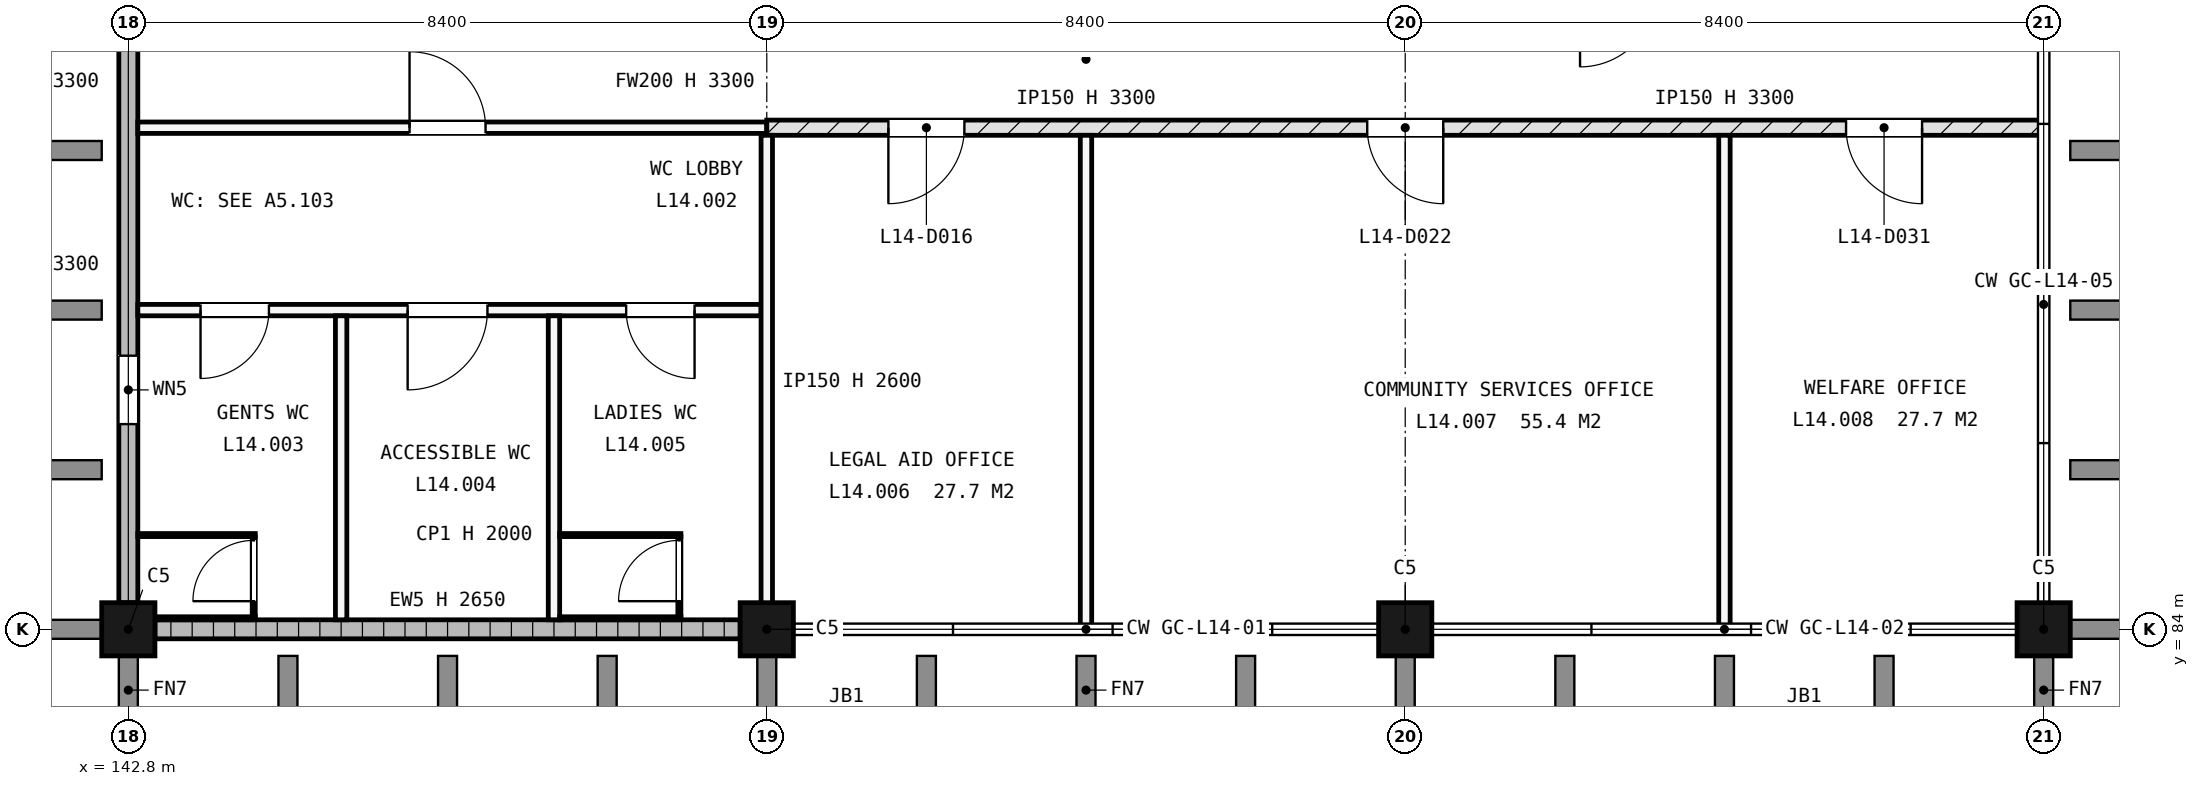
"""IFC4 building model, lengths in metres.
Left out: names, types, materials, properties, quantities, classifications, styles, units other than length and angle.
Written with IfcOpenShell. Run it as: python <this file> out.ifc"""

import sys

from ifc_helpers import new_model, si_unit, direction, frame, frame_2d, origin, origin_2d, place, context, subcontext, project, spatial, rectangle, extrude, element, fill, save


model = new_model("IFC4")
c1 = context("Model", 3, precision=1e-05, world=origin(), true_north=direction((0.0, 1.0)))
c2 = subcontext(c1, "Body", "Model", "MODEL_VIEW")
j1 = project(units=[si_unit("LENGTHUNIT", "METRE"), si_unit("PLANEANGLEUNIT", "RADIAN")], contexts=[c1])
p1 = place(None, origin())
s1 = spatial("IfcSite", under=j1, at=p1, CompositionType="ELEMENT")
p2 = place(p1, origin())
s2 = spatial("IfcBuilding", under=s1, at=p2, CompositionType="ELEMENT")
p3 = place(p2, frame((0.0, 0.0, 54.0)))
s3 = spatial("IfcBuildingStorey", under=s2, at=p3, CompositionType="ELEMENT", Elevation=54.0)
for number, where, z_axis, x_axis in (
    (1, (142.8, 84.0, -0.3), (0.0, 0.0, 1.0), (1.0, 0.0, 0.0)),
    (2, (151.2, 84.0, -0.3), (0.0, 0.0, 1.0), (1.0, 0.0, 0.0)),
    (3, (159.6, 84.0, -0.3), (0.0, 0.0, 1.0), (1.0, 0.0, 0.0)),
    (4, (168.0, 84.0, -0.3), (0.0, 0.0, 1.0), (1.0, 0.0, 0.0)),
):
    element("IfcColumn", number, at=place(p3, frame(where, z_axis=z_axis, x_axis=x_axis)), inside=s3, PredefinedType="COLUMN", context=c2, shape_type="SweptSolid", body=[
        extrude(rectangle(XDim=0.7, YDim=0.7, at=origin_2d()), origin(), (0.0, 0.0, 1.0), 3.6),
    ])
p4 = place(p3, frame((143.15, 84.0, 0.0), z_axis=(0.0, 0.0, 1.0), x_axis=(1.0, 0.0, 0.0)))
e5 = element("IfcWall", 5, at=p4, inside=s3, PredefinedType="STANDARD", context=c2, shape_type="SweptSolid", body=[
    extrude(rectangle(XDim=7.7, YDim=0.25, at=frame_2d((3.85, 0.0))), origin(), (0.0, 0.0, 1.0), 2.65),
])
p5 = place(p3, frame((142.8, 84.35, 0.0), z_axis=(0.0, 0.0, 1.0), x_axis=(0.0, 1.0, 0.0)))
e6 = element("IfcWall", 6, at=p5, inside=s3, PredefinedType="STANDARD", context=c2, shape_type="SweptSolid", body=[
    extrude(rectangle(XDim=7.85, YDim=0.25, at=frame_2d((3.925, 0.0))), origin(), (0.0, 0.0, 1.0), 3.3),
])
p6 = place(p5, frame((2.35, 0.0, 2.1)))
e7 = element("IfcOpeningElement", 7, at=p6, cuts=e6, PredefinedType="OPENING", context=c2, shape_type="SweptSolid", body=[
    extrude(rectangle(XDim=0.9, YDim=0.6, at=frame_2d((0.45, 0.3))), frame((0.0, 0.135, 0.0), z_axis=(0.0, -1.0, 0.0), x_axis=(1.0, 0.0, 0.0)), (0.0, 0.0, 1.0), 0.27),
])
p7 = place(p3, frame((142.925, 88.2, 0.0), z_axis=(0.0, 0.0, 1.0), x_axis=(1.0, 0.0, 0.0)))
e8 = element("IfcWall", 8, at=p7, inside=s3, PredefinedType="PARTITIONING", context=c2, shape_type="SweptSolid", body=[
    extrude(rectangle(XDim=8.2, YDim=0.15, at=frame_2d((4.1, 0.0))), origin(), (0.0, 0.0, 1.0), 3.3),
])
p8 = place(p7, frame((0.825, 0.0, 0.0)))
e9 = element("IfcOpeningElement", 9, at=p8, cuts=e8, PredefinedType="OPENING", context=c2, shape_type="SweptSolid", body=[
    extrude(rectangle(XDim=0.9, YDim=2.1, at=frame_2d((0.45, 1.05))), frame((0.0, 0.085, 0.0), z_axis=(0.0, -1.0, 0.0), x_axis=(1.0, 0.0, 0.0)), (0.0, 0.0, 1.0), 0.17),
])
p9 = place(p7, frame((3.55, 0.0, 0.0)))
e10 = element("IfcOpeningElement", 10, at=p9, cuts=e8, PredefinedType="OPENING", context=c2, shape_type="SweptSolid", body=[
    extrude(rectangle(XDim=1.05, YDim=2.25, at=frame_2d((0.525, 1.125))), frame((0.0, 0.085, 0.0), z_axis=(0.0, -1.0, 0.0), x_axis=(1.0, 0.0, 0.0)), (0.0, 0.0, 1.0), 0.17),
])
p10 = place(p7, frame((6.425, 0.0, 0.0)))
e11 = element("IfcOpeningElement", 11, at=p10, cuts=e8, PredefinedType="OPENING", context=c2, shape_type="SweptSolid", body=[
    extrude(rectangle(XDim=0.9, YDim=2.1, at=frame_2d((0.45, 1.05))), frame((0.0, 0.085, 0.0), z_axis=(0.0, -1.0, 0.0), x_axis=(1.0, 0.0, 0.0)), (0.0, 0.0, 1.0), 0.17),
])
p11 = place(p3, frame((142.925, 90.6, 0.0), z_axis=(0.0, 0.0, 1.0), x_axis=(1.0, 0.0, 0.0)))
e12 = element("IfcWall", 12, at=p11, inside=s3, PredefinedType="PARTITIONING", context=c2, shape_type="SweptSolid", body=[
    extrude(rectangle(XDim=8.275, YDim=0.15, at=frame_2d((4.137, 0.0))), origin(), (0.0, 0.0, 1.0), 3.3),
])
p12 = place(p11, frame((3.575, 0.0, 0.0)))
e13 = element("IfcOpeningElement", 13, at=p12, cuts=e12, PredefinedType="OPENING", context=c2, shape_type="SweptSolid", body=[
    extrude(rectangle(XDim=1.0, YDim=2.1, at=frame_2d((0.5, 1.05))), frame((0.0, 0.085, 0.0), z_axis=(0.0, -1.0, 0.0), x_axis=(1.0, 0.0, 0.0)), (0.0, 0.0, 1.0), 0.17),
])
p13 = place(p3, frame((151.2, 90.6, 0.0), z_axis=(0.0, 0.0, 1.0), x_axis=(1.0, 0.0, 0.0)))
e14 = element("IfcWall", 14, at=p13, inside=s3, PredefinedType="SOLIDWALL", context=c2, shape_type="SweptSolid", body=[
    extrude(rectangle(XDim=16.8, YDim=0.2, at=frame_2d((8.4, 0.0))), origin(), (0.0, 0.0, 1.0), 3.3),
])
p14 = place(p13, frame((1.6, 0.0, 0.0)))
e15 = element("IfcOpeningElement", 15, at=p14, cuts=e14, PredefinedType="OPENING", context=c2, shape_type="SweptSolid", body=[
    extrude(rectangle(XDim=1.0, YDim=2.1, at=frame_2d((0.5, 1.05))), frame((0.0, 0.11, 0.0), z_axis=(0.0, -1.0, 0.0), x_axis=(1.0, 0.0, 0.0)), (0.0, 0.0, 1.0), 0.22),
])
p15 = place(p13, frame((7.9, 0.0, 0.0)))
e16 = element("IfcOpeningElement", 16, at=p15, cuts=e14, PredefinedType="OPENING", context=c2, shape_type="SweptSolid", body=[
    extrude(rectangle(XDim=1.0, YDim=2.1, at=frame_2d((0.5, 1.05))), frame((0.0, 0.11, 0.0), z_axis=(0.0, -1.0, 0.0), x_axis=(1.0, 0.0, 0.0)), (0.0, 0.0, 1.0), 0.22),
])
p16 = place(p13, frame((14.2, 0.0, 0.0)))
e17 = element("IfcOpeningElement", 17, at=p16, cuts=e14, PredefinedType="OPENING", context=c2, shape_type="SweptSolid", body=[
    extrude(rectangle(XDim=1.0, YDim=2.1, at=frame_2d((0.5, 1.05))), frame((0.0, 0.11, 0.0), z_axis=(0.0, -1.0, 0.0), x_axis=(1.0, 0.0, 0.0)), (0.0, 0.0, 1.0), 0.22),
])
for number, where, z_axis, x_axis in (
    (18, (145.6, 84.125, 0.0), (0.0, 0.0, 1.0), (0.0, 1.0, 0.0)),
    (19, (148.4, 84.125, 0.0), (0.0, 0.0, 1.0), (0.0, 1.0, 0.0)),
):
    element("IfcWall", number, at=place(p3, frame(where, z_axis=z_axis, x_axis=x_axis)), inside=s3, PredefinedType="PARTITIONING", context=c2, shape_type="SweptSolid", body=[
        extrude(rectangle(XDim=4.0, YDim=0.15, at=frame_2d((2.0, 0.0))), origin(), (0.0, 0.0, 1.0), 3.3),
    ])
p17 = place(p3, frame((151.2, 84.0, 0.0), z_axis=(0.0, 0.0, 1.0), x_axis=(0.0, 1.0, 0.0)))
e20 = element("IfcWall", 20, at=p17, inside=s3, PredefinedType="PARTITIONING", context=c2, shape_type="SweptSolid", body=[
    extrude(rectangle(XDim=6.5, YDim=0.15, at=frame_2d((3.25, 0.0))), origin(), (0.0, 0.0, 1.0), 2.6),
])
for number, where, z_axis, x_axis in (
    (21, (155.4, 84.0, 0.0), (0.0, 0.0, 1.0), (0.0, 1.0, 0.0)),
    (22, (163.8, 84.0, 0.0), (0.0, 0.0, 1.0), (0.0, 1.0, 0.0)),
):
    element("IfcWall", number, at=place(p3, frame(where, z_axis=z_axis, x_axis=x_axis)), inside=s3, PredefinedType="PARTITIONING", context=c2, shape_type="SweptSolid", body=[
        extrude(rectangle(XDim=6.5, YDim=0.15, at=frame_2d((3.25, 0.0))), origin(), (0.0, 0.0, 1.0), 3.3),
    ])
p18 = place(p3, frame((142.93, 84.145, 0.0), z_axis=(0.0, 0.0, 1.0), x_axis=(1.0, 0.0, 0.0)))
e23 = element("IfcWall", 23, at=p18, inside=s3, PredefinedType="PARTITIONING", context=c2, shape_type="SweptSolid", body=[
    extrude(rectangle(XDim=1.54, YDim=0.04, at=frame_2d((0.77, 0.0))), origin(), (0.0, 0.0, 1.0), 2.0),
])
p19 = place(p3, frame((142.925, 85.24, 0.0), z_axis=(0.0, 0.0, 1.0), x_axis=(1.0, 0.0, 0.0)))
e24 = element("IfcWall", 24, at=p19, inside=s3, PredefinedType="PARTITIONING", context=c2, shape_type="SweptSolid", body=[
    extrude(rectangle(XDim=1.545, YDim=0.04, at=frame_2d((0.772, 0.0))), origin(), (0.0, 0.0, 1.0), 2.0),
])
p20 = place(p3, frame((144.45, 84.165, 0.0), z_axis=(0.0, 0.0, 1.0), x_axis=(0.0, 1.0, 0.0)))
e25 = element("IfcWall", 25, at=p20, inside=s3, PredefinedType="PARTITIONING", context=c2, shape_type="SweptSolid", body=[
    extrude(rectangle(XDim=1.055, YDim=0.04, at=frame_2d((0.527, 0.0))), origin(), (0.0, 0.0, 1.0), 2.0),
])
p21 = place(p20, frame((0.205, 0.0, 0.0)))
e26 = element("IfcOpeningElement", 26, at=p21, cuts=e25, PredefinedType="OPENING", context=c2, shape_type="SweptSolid", body=[
    extrude(rectangle(XDim=0.8, YDim=2.0, at=frame_2d((0.4, 1.0))), frame((0.0, 0.03, 0.0), z_axis=(0.0, -1.0, 0.0), x_axis=(1.0, 0.0, 0.0)), (0.0, 0.0, 1.0), 0.06),
])
for number, where, z_axis, x_axis in (
    (27, (148.475, 84.145, 0.0), (0.0, 0.0, 1.0), (1.0, 0.0, 0.0)),
    (28, (148.475, 85.24, 0.0), (0.0, 0.0, 1.0), (1.0, 0.0, 0.0)),
):
    element("IfcWall", number, at=place(p3, frame(where, z_axis=z_axis, x_axis=x_axis)), inside=s3, PredefinedType="PARTITIONING", context=c2, shape_type="SweptSolid", body=[
        extrude(rectangle(XDim=1.595, YDim=0.04, at=frame_2d((0.797, 0.0))), origin(), (0.0, 0.0, 1.0), 2.0),
    ])
p22 = place(p3, frame((150.05, 84.165, 0.0), z_axis=(0.0, 0.0, 1.0), x_axis=(0.0, 1.0, 0.0)))
e29 = element("IfcWall", 29, at=p22, inside=s3, PredefinedType="PARTITIONING", context=c2, shape_type="SweptSolid", body=[
    extrude(rectangle(XDim=1.055, YDim=0.04, at=frame_2d((0.527, 0.0))), origin(), (0.0, 0.0, 1.0), 2.0),
])
p23 = place(p22, frame((0.205, 0.0, 0.0)))
e30 = element("IfcOpeningElement", 30, at=p23, cuts=e29, PredefinedType="OPENING", context=c2, shape_type="SweptSolid", body=[
    extrude(rectangle(XDim=0.8, YDim=2.0, at=frame_2d((0.4, 1.0))), frame((0.0, 0.03, 0.0), z_axis=(0.0, -1.0, 0.0), x_axis=(1.0, 0.0, 0.0)), (0.0, 0.0, 1.0), 0.06),
])
p24 = place(p6, origin())
e31 = element("IfcWindow", 31, at=p24, inside=s3, PartitioningType="SINGLE_PANEL", PredefinedType="WINDOW", context=c2, shape_type="SweptSolid", body=[
    extrude(rectangle(XDim=0.9, YDim=0.6, at=frame_2d((0.45, 0.3))), frame((0.0, 0.03, 0.0), z_axis=(0.0, -1.0, 0.0), x_axis=(1.0, 0.0, 0.0)), (0.0, 0.0, 1.0), 0.06),
])
fill(e7, e31)
p25 = place(p8, origin())
e32 = element("IfcDoor", 32, at=p25, inside=s3, OperationType="SINGLE_SWING_LEFT", PredefinedType="DOOR", context=c2, shape_type="SweptSolid", body=[
    extrude(rectangle(XDim=0.9, YDim=2.1, at=frame_2d((0.45, 1.05))), frame((0.0, 0.025, 0.0), z_axis=(0.0, -1.0, 0.0), x_axis=(1.0, 0.0, 0.0)), (0.0, 0.0, 1.0), 0.05),
])
fill(e9, e32)
p26 = place(p9, origin())
e33 = element("IfcDoor", 33, at=p26, inside=s3, OperationType="SINGLE_SWING_LEFT", PredefinedType="DOOR", context=c2, shape_type="SweptSolid", body=[
    extrude(rectangle(XDim=1.05, YDim=2.25, at=frame_2d((0.525, 1.125))), frame((0.0, 0.025, 0.0), z_axis=(0.0, -1.0, 0.0), x_axis=(1.0, 0.0, 0.0)), (0.0, 0.0, 1.0), 0.05),
])
fill(e10, e33)
p27 = place(p10, origin())
e34 = element("IfcDoor", 34, at=p27, inside=s3, OperationType="SINGLE_SWING_RIGHT", PredefinedType="DOOR", context=c2, shape_type="SweptSolid", body=[
    extrude(rectangle(XDim=0.9, YDim=2.1, at=frame_2d((0.45, 1.05))), frame((0.0, 0.025, 0.0), z_axis=(0.0, -1.0, 0.0), x_axis=(1.0, 0.0, 0.0)), (0.0, 0.0, 1.0), 0.05),
])
fill(e11, e34)
p28 = place(p14, origin())
e35 = element("IfcDoor", 35, at=p28, inside=s3, OperationType="SINGLE_SWING_LEFT", PredefinedType="DOOR", context=c2, shape_type="SweptSolid", body=[
    extrude(rectangle(XDim=1.0, YDim=2.1, at=frame_2d((0.5, 1.05))), frame((0.0, 0.025, 0.0), z_axis=(0.0, -1.0, 0.0), x_axis=(1.0, 0.0, 0.0)), (0.0, 0.0, 1.0), 0.05),
])
fill(e15, e35)
p29 = place(p15, origin())
e36 = element("IfcDoor", 36, at=p29, inside=s3, OperationType="SINGLE_SWING_RIGHT", PredefinedType="DOOR", context=c2, shape_type="SweptSolid", body=[
    extrude(rectangle(XDim=1.0, YDim=2.1, at=frame_2d((0.5, 1.05))), frame((0.0, 0.025, 0.0), z_axis=(0.0, -1.0, 0.0), x_axis=(1.0, 0.0, 0.0)), (0.0, 0.0, 1.0), 0.05),
])
fill(e16, e36)
p30 = place(p16, origin())
e37 = element("IfcDoor", 37, at=p30, inside=s3, OperationType="SINGLE_SWING_RIGHT", PredefinedType="DOOR", context=c2, shape_type="SweptSolid", body=[
    extrude(rectangle(XDim=1.0, YDim=2.1, at=frame_2d((0.5, 1.05))), frame((0.0, 0.025, 0.0), z_axis=(0.0, -1.0, 0.0), x_axis=(1.0, 0.0, 0.0)), (0.0, 0.0, 1.0), 0.05),
])
fill(e17, e37)
p31 = place(p12, origin())
e38 = element("IfcDoor", 38, at=p31, inside=s3, OperationType="SINGLE_SWING_RIGHT", PredefinedType="DOOR", context=c2, shape_type="SweptSolid", body=[
    extrude(rectangle(XDim=1.0, YDim=2.1, at=frame_2d((0.5, 1.05))), frame((0.0, 0.025, 0.0), z_axis=(0.0, -1.0, 0.0), x_axis=(1.0, 0.0, 0.0)), (0.0, 0.0, 1.0), 0.05),
])
fill(e13, e38)
p32 = place(p21, origin())
e39 = element("IfcDoor", 39, at=p32, inside=s3, OperationType="SINGLE_SWING_LEFT", PredefinedType="DOOR", context=c2, shape_type="SweptSolid", body=[
    extrude(rectangle(XDim=0.8, YDim=2.0, at=frame_2d((0.4, 1.0))), frame((0.0, 0.02, 0.0), z_axis=(0.0, -1.0, 0.0), x_axis=(1.0, 0.0, 0.0)), (0.0, 0.0, 1.0), 0.04),
])
fill(e26, e39)
p33 = place(p23, origin())
e40 = element("IfcDoor", 40, at=p33, inside=s3, OperationType="SINGLE_SWING_LEFT", PredefinedType="DOOR", context=c2, shape_type="SweptSolid", body=[
    extrude(rectangle(XDim=0.8, YDim=2.0, at=frame_2d((0.4, 1.0))), frame((0.0, 0.02, 0.0), z_axis=(0.0, -1.0, 0.0), x_axis=(1.0, 0.0, 0.0)), (0.0, 0.0, 1.0), 0.04),
])
fill(e30, e40)
save(model, sys.argv[1])
